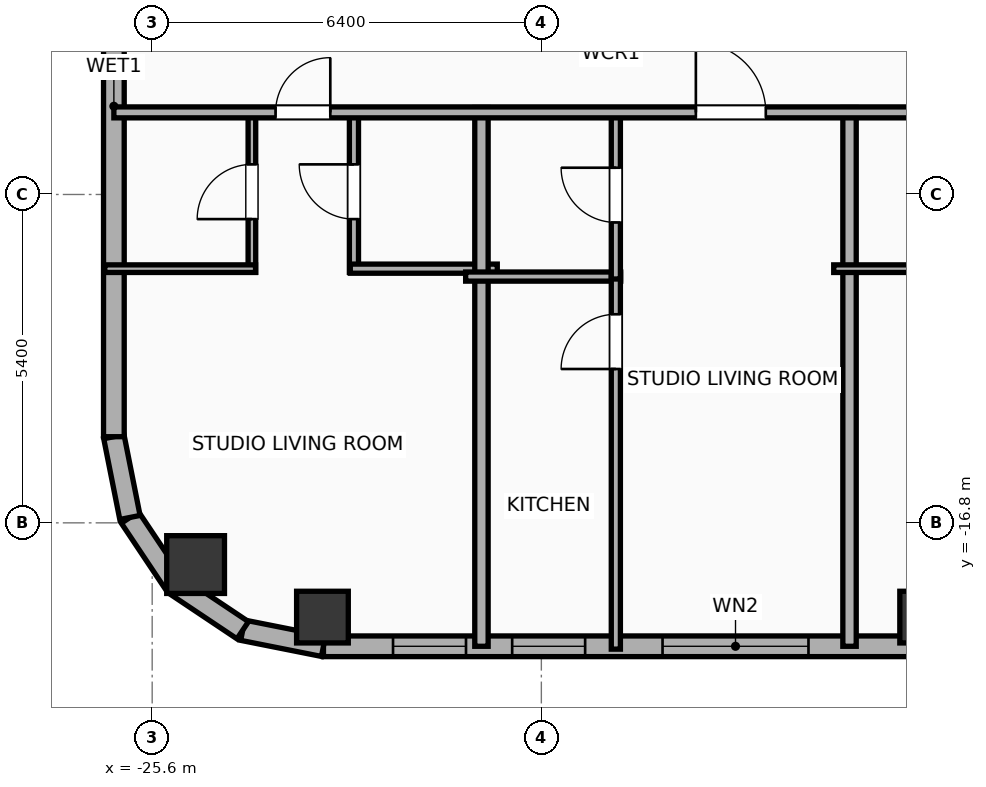
"""IFC4 building model, lengths in metres.
Left out: names, types, materials, properties, quantities, classifications, styles, units other than length and angle.
Written with IfcOpenShell. Run it as: python <this file> out.ifc"""

import sys

from ifc_helpers import new_model, si_unit, direction, frame, frame_2d, origin, origin_2d, place, context, subcontext, project, spatial, rectangle, hollow_rectangle, hollow_circle, extrude, element, fill, save


model = new_model("IFC4")
c1 = context("Model", 3, precision=1e-05, world=origin(), true_north=direction((0.0, 1.0)))
c2 = subcontext(c1, "Body", "Model", "MODEL_VIEW")
j1 = project(units=[si_unit("LENGTHUNIT", "METRE"), si_unit("PLANEANGLEUNIT", "RADIAN")], contexts=[c1])
p1 = place(None, origin())
s1 = spatial("IfcSite", under=j1, at=p1, CompositionType="ELEMENT")
p2 = place(p1, origin())
s2 = spatial("IfcBuilding", under=s1, at=p2, CompositionType="ELEMENT")
p3 = place(p2, frame((0.0, 0.0, 211.9)))
s3 = spatial("IfcBuildingStorey", under=s2, at=p3, CompositionType="ELEMENT", Elevation=211.9)
for number, where, z_axis, x_axis in (
    (1, (-22.8, -18.35, 0.0), (0.0, 0.0, 1.0), (1.0, 0.0, 0.0)),
    (2, (-12.88, -18.35, 0.0), (0.0, 0.0, 1.0), (1.0, 0.0, 0.0)),
):
    element("IfcColumn", number, at=place(p3, frame(where, z_axis=z_axis, x_axis=x_axis)), inside=s3, PredefinedType="COLUMN", context=c2, shape_type="SweptSolid", body=[
        extrude(hollow_rectangle(XDim=0.85, YDim=0.85, WallThickness=0.028, at=origin_2d()), origin(), (0.0, 0.0, 1.0), 3.9),
    ])
p4 = place(p3, frame((-24.886, -17.486, 0.0), z_axis=(0.0, 0.0, 1.0), x_axis=(1.0, 0.0, 0.0)))
e3 = element("IfcColumn", 3, at=p4, inside=s3, PredefinedType="COLUMN", context=c2, shape_type="SweptSolid", body=[
    extrude(hollow_circle(Radius=0.475, WallThickness=0.032, at=origin_2d()), origin(), (0.0, 0.0, 1.0), 3.9),
])
p5 = place(p3, frame((-5.931, -18.83, 0.0), z_axis=(0.0, 0.0, 1.0), x_axis=(-1.0, 0.0, 0.0)))
e4 = element("IfcWall", 4, at=p5, inside=s3, PredefinedType="ELEMENTEDWALL", context=c2, shape_type="SweptSolid", body=[
    extrude(rectangle(XDim=16.853, YDim=0.34, at=frame_2d((8.426, 0.0))), origin(), (0.0, 0.0, 1.0), 3.65),
])
p6 = place(p5, frame((8.876, 0.0, 0.75)))
e5 = element("IfcOpeningElement", 5, at=p6, cuts=e4, PredefinedType="OPENING", context=c2, shape_type="SweptSolid", body=[
    extrude(rectangle(XDim=2.4, YDim=2.1, at=frame_2d((1.2, 1.05))), frame((0.0, 0.18, 0.0), z_axis=(0.0, -1.0, 0.0), x_axis=(1.0, 0.0, 0.0)), (0.0, 0.0, 1.0), 0.36),
])
p7 = place(p5, frame((14.509, 0.0, 0.75)))
e6 = element("IfcOpeningElement", 6, at=p7, cuts=e4, PredefinedType="OPENING", context=c2, shape_type="SweptSolid", body=[
    extrude(rectangle(XDim=1.2, YDim=2.05, at=frame_2d((0.6, 1.025))), frame((0.0, 0.18, 0.0), z_axis=(0.0, -1.0, 0.0), x_axis=(1.0, 0.0, 0.0)), (0.0, 0.0, 1.0), 0.36),
])
p8 = place(p5, frame((12.549, 0.0, 0.75)))
e7 = element("IfcOpeningElement", 7, at=p8, cuts=e4, PredefinedType="OPENING", context=c2, shape_type="SweptSolid", body=[
    extrude(rectangle(XDim=1.2, YDim=2.05, at=frame_2d((0.6, 1.025))), frame((0.0, 0.18, 0.0), z_axis=(0.0, -1.0, 0.0), x_axis=(1.0, 0.0, 0.0)), (0.0, 0.0, 1.0), 0.36),
])
p9 = place(p5, frame((4.575, 0.0, 0.75)))
e8 = element("IfcOpeningElement", 8, at=p9, cuts=e4, PredefinedType="OPENING", context=c2, shape_type="SweptSolid", body=[
    extrude(rectangle(XDim=1.2, YDim=2.05, at=frame_2d((0.6, 1.025))), frame((0.0, 0.18, 0.0), z_axis=(0.0, -1.0, 0.0), x_axis=(1.0, 0.0, 0.0)), (0.0, 0.0, 1.0), 0.36),
])
p10 = place(p3, frame((-22.783, -18.83, 0.0), z_axis=(0.0, 0.0, 1.0), x_axis=(-0.980788153188, 0.195075878998, 0.0)))
e9 = element("IfcWall", 9, at=p10, inside=s3, PredefinedType="ELEMENTEDWALL", context=c2, shape_type="SweptSolid", body=[
    extrude(rectangle(XDim=1.354, YDim=0.34, at=frame_2d((0.677, 0.0))), origin(), (0.0, 0.0, 1.0), 3.65),
])
p11 = place(p3, frame((-24.111, -18.566, 0.0), z_axis=(0.0, 0.0, 1.0), x_axis=(-0.831403586725, 0.555669034571, 0.0)))
e10 = element("IfcWall", 10, at=p11, inside=s3, PredefinedType="ELEMENTEDWALL", context=c2, shape_type="SweptSolid", body=[
    extrude(rectangle(XDim=1.337, YDim=0.34, at=frame_2d((0.668, 0.0))), origin(), (0.0, 0.0, 1.0), 3.65),
])
p12 = place(p3, frame((-25.223, -17.823, 0.0), z_axis=(0.0, 0.0, 1.0), x_axis=(-0.555584683399, 0.831459956686, 0.0)))
e11 = element("IfcWall", 11, at=p12, inside=s3, PredefinedType="ELEMENTEDWALL", context=c2, shape_type="SweptSolid", body=[
    extrude(rectangle(XDim=1.337, YDim=0.34, at=frame_2d((0.668, 0.0))), origin(), (0.0, 0.0, 1.0), 3.65),
])
p13 = place(p3, frame((-25.966, -16.711, 0.0), z_axis=(0.0, 0.0, 1.0), x_axis=(-0.195110379894, 0.98078129043, 0.0)))
e12 = element("IfcWall", 12, at=p13, inside=s3, PredefinedType="ELEMENTEDWALL", context=c2, shape_type="SweptSolid", body=[
    extrude(rectangle(XDim=1.354, YDim=0.34, at=frame_2d((0.677, 0.0))), origin(), (0.0, 0.0, 1.0), 3.65),
])
p14 = place(p3, frame((-26.23, -15.383, 0.0), z_axis=(0.0, 0.0, 1.0), x_axis=(0.0, 1.0, 0.0)))
e13 = element("IfcWall", 13, at=p14, inside=s3, PredefinedType="ELEMENTEDWALL", context=c2, shape_type="SweptSolid", body=[
    extrude(rectangle(XDim=10.869, YDim=0.34, at=frame_2d((5.434, 0.0))), origin(), (0.0, 0.0, 1.0), 3.65),
])
p15 = place(p3, frame((-23.96, -12.68, 0.0), z_axis=(0.0, 0.0, 1.0), x_axis=(0.0, 1.0, 0.0)))
e14 = element("IfcWall", 14, at=p15, inside=s3, PredefinedType="PARTITIONING", context=c2, shape_type="SweptSolid", body=[
    extrude(rectangle(XDim=2.65, YDim=0.125, at=frame_2d((1.325, 0.0))), origin(), (0.0, 0.0, 1.0), 3.65),
])
p16 = place(p15, frame((0.875, 0.0, 0.0)))
e15 = element("IfcOpeningElement", 15, at=p16, cuts=e14, PredefinedType="OPENING", context=c2, shape_type="SweptSolid", body=[
    extrude(rectangle(XDim=0.9, YDim=2.05, at=frame_2d((0.45, 1.025))), frame((0.0, 0.073, 0.0), z_axis=(0.0, -1.0, 0.0), x_axis=(1.0, 0.0, 0.0)), (0.0, 0.0, 1.0), 0.145),
])
p17 = place(p3, frame((-22.282, -12.68, 0.0), z_axis=(0.0, 0.0, 1.0), x_axis=(0.0, 1.0, 0.0)))
e16 = element("IfcWall", 16, at=p17, inside=s3, PredefinedType="PLUMBINGWALL", context=c2, shape_type="SweptSolid", body=[
    extrude(rectangle(XDim=2.65, YDim=0.15, at=frame_2d((1.325, 0.0))), origin(), (0.0, 0.0, 1.0), 3.65),
])
p18 = place(p17, frame((0.875, 0.0, 0.0)))
e17 = element("IfcOpeningElement", 17, at=p18, cuts=e16, PredefinedType="OPENING", context=c2, shape_type="SweptSolid", body=[
    extrude(rectangle(XDim=0.9, YDim=2.05, at=frame_2d((0.45, 1.025))), frame((0.0, 0.085, 0.0), z_axis=(0.0, -1.0, 0.0), x_axis=(1.0, 0.0, 0.0)), (0.0, 0.0, 1.0), 0.17),
])
p19 = place(p3, frame((-26.38, -12.62, 0.0), z_axis=(0.0, 0.0, 1.0), x_axis=(1.0, 0.0, 0.0)))
e18 = element("IfcWall", 18, at=p19, inside=s3, PredefinedType="PARTITIONING", context=c2, shape_type="SweptSolid", body=[
    extrude(rectangle(XDim=2.48, YDim=0.125, at=frame_2d((1.24, 0.0))), origin(), (0.0, 0.0, 1.0), 3.65),
])
p20 = place(p3, frame((-22.342, -12.62, 0.0), z_axis=(0.0, 0.0, 1.0), x_axis=(1.0, 0.0, 0.0)))
e19 = element("IfcWall", 19, at=p20, inside=s3, PredefinedType="PLUMBINGWALL", context=c2, shape_type="SweptSolid", body=[
    extrude(rectangle(XDim=2.417, YDim=0.15, at=frame_2d((1.208, 0.0))), origin(), (0.0, 0.0, 1.0), 3.65),
])
p21 = place(p3, frame((-20.185, -18.83, 0.0), z_axis=(0.0, 0.0, 1.0), x_axis=(0.0, 1.0, 0.0)))
e20 = element("IfcWall", 20, at=p21, inside=s3, PredefinedType="PARTITIONING", context=c2, shape_type="SweptSolid", body=[
    extrude(rectangle(XDim=8.86, YDim=0.22, at=frame_2d((4.43, 0.0))), origin(), (0.0, 0.0, 1.0), 3.09),
])
p22 = place(p3, frame((-20.445, -12.75, 0.0), z_axis=(0.0, 0.0, 1.0), x_axis=(1.0, 0.0, 0.0)))
e21 = element("IfcWall", 21, at=p22, inside=s3, PredefinedType="PLUMBINGWALL", context=c2, shape_type="SweptSolid", body=[
    extrude(rectangle(XDim=2.55, YDim=0.15, at=frame_2d((1.275, 0.0))), origin(), (0.0, 0.0, 1.0), 3.65),
])
p23 = place(p3, frame((-17.975, -18.877, 0.0), z_axis=(0.0, 0.0, 1.0), x_axis=(0.0, 1.0, 0.0)))
e22 = element("IfcWall", 22, at=p23, inside=s3, PredefinedType="PLUMBINGWALL", context=c2, shape_type="SweptSolid", body=[
    extrude(rectangle(XDim=6.167, YDim=0.15, at=frame_2d((3.083, 0.0))), origin(), (0.0, 0.0, 1.0), 3.65),
])
p24 = place(p23, frame((4.607, 0.0, 0.0)))
e23 = element("IfcOpeningElement", 23, at=p24, cuts=e22, PredefinedType="OPENING", context=c2, shape_type="SweptSolid", body=[
    extrude(rectangle(XDim=0.9, YDim=2.05, at=frame_2d((0.45, 1.025))), frame((0.0, 0.085, 0.0), z_axis=(0.0, -1.0, 0.0), x_axis=(1.0, 0.0, 0.0)), (0.0, 0.0, 1.0), 0.17),
])
p25 = place(p3, frame((-17.975, -12.79, 0.0), z_axis=(0.0, 0.0, 1.0), x_axis=(0.0, 1.0, 0.0)))
e24 = element("IfcWall", 24, at=p25, inside=s3, PredefinedType="PLUMBINGWALL", context=c2, shape_type="SweptSolid", body=[
    extrude(rectangle(XDim=2.76, YDim=0.15, at=frame_2d((1.38, 0.0))), origin(), (0.0, 0.0, 1.0), 3.65),
])
p26 = place(p25, frame((0.93, 0.0, 0.0)))
e25 = element("IfcOpeningElement", 25, at=p26, cuts=e24, PredefinedType="OPENING", context=c2, shape_type="SweptSolid", body=[
    extrude(rectangle(XDim=0.9, YDim=2.05, at=frame_2d((0.45, 1.025))), frame((0.0, 0.085, 0.0), z_axis=(0.0, -1.0, 0.0), x_axis=(1.0, 0.0, 0.0)), (0.0, 0.0, 1.0), 0.17),
])
p27 = place(p3, frame((-14.132, -18.83, 0.0), z_axis=(0.0, 0.0, 1.0), x_axis=(0.0, 1.0, 0.0)))
e26 = element("IfcWall", 26, at=p27, inside=s3, PredefinedType="PARTITIONING", context=c2, shape_type="SweptSolid", body=[
    extrude(rectangle(XDim=8.86, YDim=0.22, at=frame_2d((4.43, 0.0))), origin(), (0.0, 0.0, 1.0), 3.65),
])
p28 = place(p3, frame((-14.392, -12.62, 0.0), z_axis=(0.0, 0.0, 1.0), x_axis=(1.0, 0.0, 0.0)))
e27 = element("IfcWall", 27, at=p28, inside=s3, PredefinedType="PARTITIONING", context=c2, shape_type="SweptSolid", body=[
    extrude(rectangle(XDim=2.634, YDim=0.125, at=frame_2d((1.317, 0.0))), origin(), (0.0, 0.0, 1.0), 3.65),
])
p29 = place(p3, frame((-26.23, -10.05, 0.0), z_axis=(0.0, 0.0, 1.0), x_axis=(1.0, 0.0, 0.0)))
e28 = element("IfcWall", 28, at=p29, inside=s3, PredefinedType="PARTITIONING", context=c2, shape_type="SweptSolid", body=[
    extrude(rectangle(XDim=18.15, YDim=0.18, at=frame_2d((9.075, 0.0))), origin(), (0.0, 0.0, 1.0), 3.65),
])
p30 = place(p29, frame((2.659, 0.0, 0.0)))
e29 = element("IfcOpeningElement", 29, at=p30, cuts=e28, PredefinedType="OPENING", context=c2, shape_type="SweptSolid", body=[
    extrude(rectangle(XDim=0.9, YDim=2.05, at=frame_2d((0.45, 1.025))), frame((0.0, 0.1, 0.0), z_axis=(0.0, -1.0, 0.0), x_axis=(1.0, 0.0, 0.0)), (0.0, 0.0, 1.0), 0.2),
])
p31 = place(p29, frame((9.571, 0.0, 0.0)))
e30 = element("IfcOpeningElement", 30, at=p31, cuts=e28, PredefinedType="OPENING", context=c2, shape_type="SweptSolid", body=[
    extrude(rectangle(XDim=1.15, YDim=2.05, at=frame_2d((0.575, 1.025))), frame((0.0, 0.1, 0.0), z_axis=(0.0, -1.0, 0.0), x_axis=(1.0, 0.0, 0.0)), (0.0, 0.0, 1.0), 0.2),
])
p32 = place(p29, frame((14.792, 0.0, 0.0)))
e31 = element("IfcOpeningElement", 31, at=p32, cuts=e28, PredefinedType="OPENING", context=c2, shape_type="SweptSolid", body=[
    extrude(rectangle(XDim=0.9, YDim=2.05, at=frame_2d((0.45, 1.025))), frame((0.0, 0.1, 0.0), z_axis=(0.0, -1.0, 0.0), x_axis=(1.0, 0.0, 0.0)), (0.0, 0.0, 1.0), 0.2),
])
p33 = place(p6, origin())
e32 = element("IfcWindow", 32, at=p33, inside=s3, PartitioningType="SINGLE_PANEL", PredefinedType="WINDOW", context=c2, shape_type="SweptSolid", body=[
    extrude(rectangle(XDim=2.4, YDim=2.1, at=frame_2d((1.2, 1.05))), frame((0.0, 0.03, 0.0), z_axis=(0.0, -1.0, 0.0), x_axis=(1.0, 0.0, 0.0)), (0.0, 0.0, 1.0), 0.06),
])
fill(e5, e32)
p34 = place(p7, origin())
e33 = element("IfcWindow", 33, at=p34, inside=s3, PartitioningType="SINGLE_PANEL", PredefinedType="WINDOW", context=c2, shape_type="SweptSolid", body=[
    extrude(rectangle(XDim=1.2, YDim=2.05, at=frame_2d((0.6, 1.025))), frame((0.0, 0.03, 0.0), z_axis=(0.0, -1.0, 0.0), x_axis=(1.0, 0.0, 0.0)), (0.0, 0.0, 1.0), 0.06),
])
fill(e6, e33)
p35 = place(p8, origin())
e34 = element("IfcWindow", 34, at=p35, inside=s3, PartitioningType="SINGLE_PANEL", PredefinedType="WINDOW", context=c2, shape_type="SweptSolid", body=[
    extrude(rectangle(XDim=1.2, YDim=2.05, at=frame_2d((0.6, 1.025))), frame((0.0, 0.03, 0.0), z_axis=(0.0, -1.0, 0.0), x_axis=(1.0, 0.0, 0.0)), (0.0, 0.0, 1.0), 0.06),
])
fill(e7, e34)
p36 = place(p16, origin())
e35 = element("IfcDoor", 35, at=p36, inside=s3, OperationType="SINGLE_SWING_LEFT", PredefinedType="DOOR", context=c2, shape_type="SweptSolid", body=[
    extrude(rectangle(XDim=0.9, YDim=2.05, at=frame_2d((0.45, 1.025))), frame((0.0, 0.025, 0.0), z_axis=(0.0, -1.0, 0.0), x_axis=(1.0, 0.0, 0.0)), (0.0, 0.0, 1.0), 0.05),
])
fill(e15, e35)
p37 = place(p18, origin())
e36 = element("IfcDoor", 36, at=p37, inside=s3, OperationType="SINGLE_SWING_RIGHT", PredefinedType="DOOR", context=c2, shape_type="SweptSolid", body=[
    extrude(rectangle(XDim=0.9, YDim=2.05, at=frame_2d((0.45, 1.025))), frame((0.0, 0.025, 0.0), z_axis=(0.0, -1.0, 0.0), x_axis=(1.0, 0.0, 0.0)), (0.0, 0.0, 1.0), 0.05),
])
fill(e17, e36)
p38 = place(p24, origin())
e37 = element("IfcDoor", 37, at=p38, inside=s3, OperationType="SINGLE_SWING_LEFT", PredefinedType="DOOR", context=c2, shape_type="SweptSolid", body=[
    extrude(rectangle(XDim=0.9, YDim=2.05, at=frame_2d((0.45, 1.025))), frame((0.0, 0.025, 0.0), z_axis=(0.0, -1.0, 0.0), x_axis=(1.0, 0.0, 0.0)), (0.0, 0.0, 1.0), 0.05),
])
fill(e23, e37)
p39 = place(p26, origin())
e38 = element("IfcDoor", 38, at=p39, inside=s3, OperationType="SINGLE_SWING_RIGHT", PredefinedType="DOOR", context=c2, shape_type="SweptSolid", body=[
    extrude(rectangle(XDim=0.9, YDim=2.05, at=frame_2d((0.45, 1.025))), frame((0.0, 0.025, 0.0), z_axis=(0.0, -1.0, 0.0), x_axis=(1.0, 0.0, 0.0)), (0.0, 0.0, 1.0), 0.05),
])
fill(e25, e38)
p40 = place(p30, origin())
e39 = element("IfcDoor", 39, at=p40, inside=s3, OperationType="SINGLE_SWING_RIGHT", PredefinedType="DOOR", context=c2, shape_type="SweptSolid", body=[
    extrude(rectangle(XDim=0.9, YDim=2.05, at=frame_2d((0.45, 1.025))), frame((0.0, 0.025, 0.0), z_axis=(0.0, -1.0, 0.0), x_axis=(1.0, 0.0, 0.0)), (0.0, 0.0, 1.0), 0.05),
])
fill(e29, e39)
p41 = place(p31, origin())
e40 = element("IfcDoor", 40, at=p41, inside=s3, OperationType="SINGLE_SWING_LEFT", PredefinedType="DOOR", context=c2, shape_type="SweptSolid", body=[
    extrude(rectangle(XDim=1.15, YDim=2.05, at=frame_2d((0.575, 1.025))), frame((0.0, 0.025, 0.0), z_axis=(0.0, -1.0, 0.0), x_axis=(1.0, 0.0, 0.0)), (0.0, 0.0, 1.0), 0.05),
])
fill(e30, e40)
save(model, sys.argv[1])
